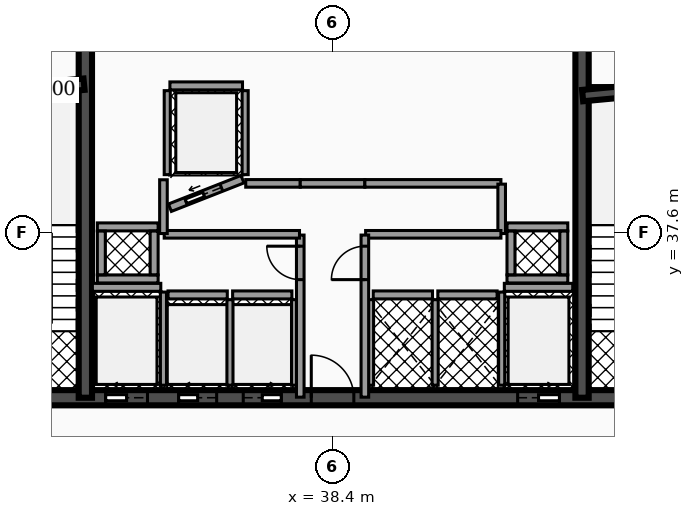
"""IFC4 building model, lengths in metres.
Left out: names, types, materials, properties, quantities, classifications, styles, units other than length and angle.
Written with IfcOpenShell. Run it as: python <this file> out.ifc"""

import sys

from ifc_helpers import new_model, si_unit, direction, frame, frame_2d, origin, place, context, subcontext, project, spatial, rectangle, extrude, element, fill, save


model = new_model("IFC4")
c1 = context("Model", 3, precision=1e-05, world=origin(), true_north=direction((0.0, 1.0)))
c2 = subcontext(c1, "Body", "Model", "MODEL_VIEW")
j1 = project(units=[si_unit("LENGTHUNIT", "METRE"), si_unit("PLANEANGLEUNIT", "RADIAN")], contexts=[c1])
p1 = place(None, origin())
s1 = spatial("IfcSite", under=j1, at=p1, CompositionType="ELEMENT")
p2 = place(p1, origin())
s2 = spatial("IfcBuilding", under=s1, at=p2, CompositionType="ELEMENT")
p3 = place(p2, frame((0.0, 0.0, 130.9)))
s3 = spatial("IfcBuildingStorey", under=s2, at=p3, CompositionType="ELEMENT", Elevation=130.9)
p4 = place(p3, frame((28.4, 33.25, 0.0), z_axis=(0.0, 0.0, 1.0), x_axis=(1.0, 0.0, 0.0)))
e1 = element("IfcWall", 1, at=p4, inside=s3, PredefinedType="SHEAR", context=c2, shape_type="SweptSolid", body=[
    extrude(rectangle(XDim=20.06, YDim=0.4, at=frame_2d((10.03, 0.0))), origin(), (0.0, 0.0, 1.0), 3.5),
])
p5 = place(p4, frame((4.03, 0.0, 0.0)))
e2 = element("IfcOpeningElement", 2, at=p5, cuts=e1, PredefinedType="OPENING", context=c2, shape_type="SweptSolid", body=[
    extrude(rectangle(XDim=1.1, YDim=2.15, at=frame_2d((0.55, 1.075))), frame((0.0, 0.21, 0.0), z_axis=(0.0, -1.0, 0.0), x_axis=(1.0, 0.0, 0.0)), (0.0, 0.0, 1.0), 0.42),
])
p6 = place(p4, frame((14.87, 0.0, 0.0)))
e3 = element("IfcOpeningElement", 3, at=p6, cuts=e1, PredefinedType="OPENING", context=c2, shape_type="SweptSolid", body=[
    extrude(rectangle(XDim=1.1, YDim=2.15, at=frame_2d((0.55, 1.075))), frame((0.0, 0.21, 0.0), z_axis=(0.0, -1.0, 0.0), x_axis=(1.0, 0.0, 0.0)), (0.0, 0.0, 1.0), 0.42),
])
p7 = place(p4, frame((5.95, 0.0, 0.0)))
e4 = element("IfcOpeningElement", 4, at=p7, cuts=e1, PredefinedType="OPENING", context=c2, shape_type="SweptSolid", body=[
    extrude(rectangle(XDim=1.0, YDim=2.1, at=frame_2d((0.5, 1.05))), frame((0.0, 0.21, 0.0), z_axis=(0.0, -1.0, 0.0), x_axis=(1.0, 0.0, 0.0)), (0.0, 0.0, 1.0), 0.42),
])
p8 = place(p4, frame((7.65, 0.0, 0.0)))
e5 = element("IfcOpeningElement", 5, at=p8, cuts=e1, PredefinedType="OPENING", context=c2, shape_type="SweptSolid", body=[
    extrude(rectangle(XDim=1.0, YDim=2.1, at=frame_2d((0.5, 1.05))), frame((0.0, 0.21, 0.0), z_axis=(0.0, -1.0, 0.0), x_axis=(1.0, 0.0, 0.0)), (0.0, 0.0, 1.0), 0.42),
])
p9 = place(p4, frame((1.31, 0.0, 0.0)))
e6 = element("IfcOpeningElement", 6, at=p9, cuts=e1, PredefinedType="OPENING", context=c2, shape_type="SweptSolid", body=[
    extrude(rectangle(XDim=1.1, YDim=2.2, at=frame_2d((0.55, 1.1))), frame((0.0, 0.21, 0.0), z_axis=(0.0, -1.0, 0.0), x_axis=(1.0, 0.0, 0.0)), (0.0, 0.0, 1.0), 0.42),
])
p10 = place(p4, frame((9.44, 0.0, 0.0)))
e7 = element("IfcOpeningElement", 7, at=p10, cuts=e1, PredefinedType="OPENING", context=c2, shape_type="SweptSolid", body=[
    extrude(rectangle(XDim=1.12, YDim=2.05, at=frame_2d((0.56, 1.025))), frame((0.0, 0.21, 0.0), z_axis=(0.0, -1.0, 0.0), x_axis=(1.0, 0.0, 0.0)), (0.0, 0.0, 1.0), 0.42),
])
p11 = place(p4, frame((17.65, 0.0, 0.0)))
e8 = element("IfcOpeningElement", 8, at=p11, cuts=e1, PredefinedType="OPENING", context=c2, shape_type="SweptSolid", body=[
    extrude(rectangle(XDim=1.1, YDim=2.2, at=frame_2d((0.55, 1.1))), frame((0.0, 0.21, 0.0), z_axis=(0.0, -1.0, 0.0), x_axis=(1.0, 0.0, 0.0)), (0.0, 0.0, 1.0), 0.42),
])
for number, where, z_axis, x_axis in (
    (9, (31.895, 33.25, 0.0), (0.0, 0.0, 1.0), (0.0, 1.0, 0.0)),
    (10, (44.965, 33.25, 0.0), (0.0, 0.0, 1.0), (0.0, 1.0, 0.0)),
):
    element("IfcWall", number, at=place(p3, frame(where, z_axis=z_axis, x_axis=x_axis)), inside=s3, PredefinedType="SHEAR", context=c2, shape_type="SweptSolid", body=[
        extrude(rectangle(XDim=10.2, YDim=0.35, at=frame_2d((5.1, 0.0))), origin(), (0.0, 0.0, 1.0), 3.5),
    ])
p12 = place(p3, frame((28.64, 41.2, 0.0), z_axis=(0.0, 0.0, 1.0), x_axis=(0.995687118776, 0.092774789157, 0.0)))
e11 = element("IfcWall", 11, at=p12, inside=s3, PredefinedType="SHEAR", context=c2, shape_type="SweptSolid", body=[
    extrude(rectangle(XDim=3.234, YDim=0.3, at=frame_2d((1.617, 0.0))), origin(), (0.0, 0.0, 1.0), 3.5),
])
p13 = place(p3, frame((44.98, 41.2, 0.0), z_axis=(0.0, 0.0, 1.0), x_axis=(0.995686468965, 0.09278176286, 0.0)))
e12 = element("IfcWall", 12, at=p13, inside=s3, PredefinedType="SHEAR", context=c2, shape_type="SweptSolid", body=[
    extrude(rectangle(XDim=3.234, YDim=0.3, at=frame_2d((1.617, 0.0))), origin(), (0.0, 0.0, 1.0), 3.5),
])
p14 = place(p3, frame((32.08, 36.155, 0.0), z_axis=(0.0, 0.0, 1.0), x_axis=(1.0, 0.0, 0.0)))
e13 = element("IfcWall", 13, at=p14, inside=s3, PredefinedType="SOLIDWALL", context=c2, shape_type="SweptSolid", body=[
    extrude(rectangle(XDim=1.8, YDim=0.21, at=frame_2d((0.9, 0.0))), origin(), (0.0, 0.0, 1.0), 2.472),
])
p15 = place(p3, frame((33.95, 33.58, 0.0), z_axis=(0.0, 0.0, 1.0), x_axis=(0.0, 1.0, 0.0)))
e14 = element("IfcWall", 14, at=p15, inside=s3, PredefinedType="SOLIDWALL", context=c2, shape_type="SweptSolid", body=[
    extrude(rectangle(XDim=2.45, YDim=0.16, at=frame_2d((1.225, 0.0))), origin(), (0.0, 0.0, 1.0), 2.472),
])
p16 = place(p3, frame((42.92, 36.155, 0.0), z_axis=(0.0, 0.0, 1.0), x_axis=(1.0, 0.0, 0.0)))
e15 = element("IfcWall", 15, at=p16, inside=s3, PredefinedType="SOLIDWALL", context=c2, shape_type="SweptSolid", body=[
    extrude(rectangle(XDim=1.8, YDim=0.21, at=frame_2d((0.9, 0.0))), origin(), (0.0, 0.0, 1.0), 2.472),
])
p17 = place(p3, frame((42.85, 33.58, 0.0), z_axis=(0.0, 0.0, 1.0), x_axis=(0.0, 1.0, 0.0)))
e16 = element("IfcWall", 16, at=p17, inside=s3, PredefinedType="SOLIDWALL", context=c2, shape_type="SweptSolid", body=[
    extrude(rectangle(XDim=2.45, YDim=0.16, at=frame_2d((1.225, 0.0))), origin(), (0.0, 0.0, 1.0), 2.472),
])
p18 = place(p3, frame((34.07, 35.955, 0.0), z_axis=(0.0, 0.0, 1.0), x_axis=(1.0, 0.0, 0.0)))
e17 = element("IfcWall", 17, at=p18, inside=s3, PredefinedType="SOLIDWALL", context=c2, shape_type="SweptSolid", body=[
    extrude(rectangle(XDim=1.56, YDim=0.21, at=frame_2d((0.78, 0.0))), origin(), (0.0, 0.0, 1.0), 2.472),
])
p19 = place(p3, frame((35.7, 33.58, 0.0), z_axis=(0.0, 0.0, 1.0), x_axis=(0.0, 1.0, 0.0)))
e18 = element("IfcWall", 18, at=p19, inside=s3, PredefinedType="SOLIDWALL", context=c2, shape_type="SweptSolid", body=[
    extrude(rectangle(XDim=2.25, YDim=0.16, at=frame_2d((1.125, 0.0))), origin(), (0.0, 0.0, 1.0), 2.472),
])
p20 = place(p3, frame((35.77, 35.955, 0.0), z_axis=(0.0, 0.0, 1.0), x_axis=(1.0, 0.0, 0.0)))
e19 = element("IfcWall", 19, at=p20, inside=s3, PredefinedType="SOLIDWALL", context=c2, shape_type="SweptSolid", body=[
    extrude(rectangle(XDim=1.56, YDim=0.21, at=frame_2d((0.78, 0.0))), origin(), (0.0, 0.0, 1.0), 2.472),
])
p21 = place(p3, frame((37.4, 33.58, 0.0), z_axis=(0.0, 0.0, 1.0), x_axis=(0.0, 1.0, 0.0)))
e20 = element("IfcWall", 20, at=p21, inside=s3, PredefinedType="SOLIDWALL", context=c2, shape_type="SweptSolid", body=[
    extrude(rectangle(XDim=2.25, YDim=0.16, at=frame_2d((1.125, 0.0))), origin(), (0.0, 0.0, 1.0), 2.472),
])
p22 = place(p3, frame((34.12, 38.25, 0.0), z_axis=(0.0, 0.0, 1.0), x_axis=(0.930804993012, 0.36551616241, 0.0)))
e21 = element("IfcWall", 21, at=p22, inside=s3, PredefinedType="SOLIDWALL", context=c2, shape_type="SweptSolid", body=[
    extrude(rectangle(XDim=2.052, YDim=0.21, at=frame_2d((1.026, 0.0))), origin(), (0.0, 0.0, 1.0), 2.472),
])
p23 = place(p22, frame((0.455, 0.0, 0.0)))
e22 = element("IfcOpeningElement", 22, at=p23, cuts=e21, PredefinedType="OPENING", context=c2, shape_type="SweptSolid", body=[
    extrude(rectangle(XDim=1.0, YDim=2.1, at=frame_2d((0.5, 1.05))), frame((0.0, 0.115, 0.0), z_axis=(0.0, -1.0, 0.0), x_axis=(1.0, 0.0, 0.0)), (0.0, 0.0, 1.0), 0.23),
])
p24 = place(p3, frame((34.12, 41.455, 0.0), z_axis=(0.0, 0.0, 1.0), x_axis=(1.0, 0.0, 0.0)))
e23 = element("IfcWall", 23, at=p24, inside=s3, PredefinedType="SOLIDWALL", context=c2, shape_type="SweptSolid", body=[
    extrude(rectangle(XDim=1.91, YDim=0.21, at=frame_2d((0.955, 0.0))), origin(), (0.0, 0.0, 1.0), 2.472),
])
for number, where, z_axis, x_axis in (
    (24, (34.05, 39.12, 0.0), (0.0, 0.0, 1.0), (0.0, 1.0, 0.0)),
    (25, (36.1, 39.12, 0.0), (0.0, 0.0, 1.0), (0.0, 1.0, 0.0)),
):
    element("IfcWall", number, at=place(p3, frame(where, z_axis=z_axis, x_axis=x_axis)), inside=s3, PredefinedType="SOLIDWALL", context=c2, shape_type="SweptSolid", body=[
        extrude(rectangle(XDim=2.21, YDim=0.16, at=frame_2d((1.105, 0.0))), origin(), (0.0, 0.0, 1.0), 2.472),
    ])
p25 = place(p3, frame((39.47, 35.955, 0.0), z_axis=(0.0, 0.0, 1.0), x_axis=(1.0, 0.0, 0.0)))
e26 = element("IfcWall", 26, at=p25, inside=s3, PredefinedType="SOLIDWALL", context=c2, shape_type="SweptSolid", body=[
    extrude(rectangle(XDim=1.56, YDim=0.21, at=frame_2d((0.78, 0.0))), origin(), (0.0, 0.0, 1.0), 2.472),
])
for number, where, z_axis, x_axis in (
    (27, (39.4, 33.58, 0.0), (0.0, 0.0, 1.0), (0.0, 1.0, 0.0)),
    (28, (41.1, 33.58, 0.0), (0.0, 0.0, 1.0), (0.0, 1.0, 0.0)),
):
    element("IfcWall", number, at=place(p3, frame(where, z_axis=z_axis, x_axis=x_axis)), inside=s3, PredefinedType="SOLIDWALL", context=c2, shape_type="SweptSolid", body=[
        extrude(rectangle(XDim=2.25, YDim=0.16, at=frame_2d((1.125, 0.0))), origin(), (0.0, 0.0, 1.0), 2.472),
    ])
p26 = place(p3, frame((41.17, 35.955, 0.0), z_axis=(0.0, 0.0, 1.0), x_axis=(1.0, 0.0, 0.0)))
e29 = element("IfcWall", 29, at=p26, inside=s3, PredefinedType="SOLIDWALL", context=c2, shape_type="SweptSolid", body=[
    extrude(rectangle(XDim=1.56, YDim=0.21, at=frame_2d((0.78, 0.0))), origin(), (0.0, 0.0, 1.0), 2.472),
])
for number, where, z_axis, x_axis in (
    (30, (32.21, 36.375, 0.0), (0.0, 0.0, 1.0), (1.0, 0.0, 0.0)),
    (31, (32.21, 37.745, 0.0), (0.0, 0.0, 1.0), (1.0, 0.0, 0.0)),
):
    element("IfcWall", number, at=place(p3, frame(where, z_axis=z_axis, x_axis=x_axis)), inside=s3, PredefinedType="SOLIDWALL", context=c2, shape_type="SweptSolid", body=[
        extrude(rectangle(XDim=1.6, YDim=0.21, at=frame_2d((0.8, 0.0))), origin(), (0.0, 0.0, 1.0), 3.5),
    ])
for number, where, z_axis, x_axis in (
    (32, (32.315, 36.485, 0.0), (0.0, 0.0, 1.0), (0.0, 1.0, 0.0)),
    (33, (33.705, 36.485, 0.0), (0.0, 0.0, 1.0), (0.0, 1.0, 0.0)),
):
    element("IfcWall", number, at=place(p3, frame(where, z_axis=z_axis, x_axis=x_axis)), inside=s3, PredefinedType="SOLIDWALL", context=c2, shape_type="SweptSolid", body=[
        extrude(rectangle(XDim=1.15, YDim=0.21, at=frame_2d((0.575, 0.0))), origin(), (0.0, 0.0, 1.0), 3.5),
    ])
for number, where, z_axis, x_axis in (
    (34, (42.99, 36.375, 0.0), (0.0, 0.0, 1.0), (1.0, 0.0, 0.0)),
    (35, (42.99, 37.745, 0.0), (0.0, 0.0, 1.0), (1.0, 0.0, 0.0)),
):
    element("IfcWall", number, at=place(p3, frame(where, z_axis=z_axis, x_axis=x_axis)), inside=s3, PredefinedType="SOLIDWALL", context=c2, shape_type="SweptSolid", body=[
        extrude(rectangle(XDim=1.6, YDim=0.21, at=frame_2d((0.8, 0.0))), origin(), (0.0, 0.0, 1.0), 3.5),
    ])
for number, where, z_axis, x_axis in (
    (36, (43.095, 36.485, 0.0), (0.0, 0.0, 1.0), (0.0, 1.0, 0.0)),
    (37, (44.485, 36.485, 0.0), (0.0, 0.0, 1.0), (0.0, 1.0, 0.0)),
):
    element("IfcWall", number, at=place(p3, frame(where, z_axis=z_axis, x_axis=x_axis)), inside=s3, PredefinedType="SOLIDWALL", context=c2, shape_type="SweptSolid", body=[
        extrude(rectangle(XDim=1.15, YDim=0.21, at=frame_2d((0.575, 0.0))), origin(), (0.0, 0.0, 1.0), 3.5),
    ])
p27 = place(p3, frame((37.55, 33.265, 0.0), z_axis=(0.0, 0.0, 1.0), x_axis=(0.0, 1.0, 0.0)))
e38 = element("IfcWall", 38, at=p27, inside=s3, PredefinedType="PARTITIONING", context=c2, shape_type="SweptSolid", body=[
    extrude(rectangle(XDim=4.265, YDim=0.2, at=frame_2d((2.133, 0.0))), origin(), (0.0, 0.0, 1.0), 2.457),
])
p28 = place(p27, frame((3.093, 0.0, 0.0)))
e39 = element("IfcOpeningElement", 39, at=p28, cuts=e38, PredefinedType="OPENING", context=c2, shape_type="SweptSolid", body=[
    extrude(rectangle(XDim=0.88, YDim=2.05, at=frame_2d((0.44, 1.025))), frame((0.0, 0.11, 0.0), z_axis=(0.0, -1.0, 0.0), x_axis=(1.0, 0.0, 0.0)), (0.0, 0.0, 1.0), 0.22),
])
p29 = place(p3, frame((33.97, 37.55, 0.0), z_axis=(0.0, 0.0, 1.0), x_axis=(1.0, 0.0, 0.0)))
e40 = element("IfcWall", 40, at=p29, inside=s3, PredefinedType="PARTITIONING", context=c2, shape_type="SweptSolid", body=[
    extrude(rectangle(XDim=3.56, YDim=0.2, at=frame_2d((1.78, 0.0))), origin(), (0.0, 0.0, 1.0), 2.457),
])
p30 = place(p3, frame((33.95, 37.57, 0.0), z_axis=(0.0, 0.0, 1.0), x_axis=(0.0, 1.0, 0.0)))
e41 = element("IfcWall", 41, at=p30, inside=s3, PredefinedType="PARTITIONING", context=c2, shape_type="SweptSolid", body=[
    extrude(rectangle(XDim=1.415, YDim=0.2, at=frame_2d((0.708, 0.0))), origin(), (0.0, 0.0, 1.0), 2.457),
])
p31 = place(p3, frame((36.115, 38.89, 0.0), z_axis=(0.0, 0.0, 1.0), x_axis=(1.0, 0.0, 0.0)))
e42 = element("IfcWall", 42, at=p31, inside=s3, PredefinedType="PARTITIONING", context=c2, shape_type="SweptSolid", body=[
    extrude(rectangle(XDim=1.435, YDim=0.2, at=frame_2d((0.718, 0.0))), origin(), (0.0, 0.0, 1.0), 2.457),
])
p32 = place(p3, frame((37.55, 38.89, 0.0), z_axis=(0.0, 0.0, 1.0), x_axis=(1.0, 0.0, 0.0)))
e43 = element("IfcWall", 43, at=p32, inside=s3, PredefinedType="PARTITIONING", context=c2, shape_type="SweptSolid", body=[
    extrude(rectangle(XDim=1.7, YDim=0.2, at=frame_2d((0.85, 0.0))), origin(), (0.0, 0.0, 1.0), 2.457),
])
p33 = place(p3, frame((39.25, 38.89, 0.0), z_axis=(0.0, 0.0, 1.0), x_axis=(1.0, 0.0, 0.0)))
e44 = element("IfcWall", 44, at=p33, inside=s3, PredefinedType="PARTITIONING", context=c2, shape_type="SweptSolid", body=[
    extrude(rectangle(XDim=3.58, YDim=0.2, at=frame_2d((1.79, 0.0))), origin(), (0.0, 0.0, 1.0), 2.457),
])
p34 = place(p3, frame((42.85, 37.57, 0.0), z_axis=(0.0, 0.0, 1.0), x_axis=(0.0, 1.0, 0.0)))
e45 = element("IfcWall", 45, at=p34, inside=s3, PredefinedType="PARTITIONING", context=c2, shape_type="SweptSolid", body=[
    extrude(rectangle(XDim=1.3, YDim=0.2, at=frame_2d((0.65, 0.0))), origin(), (0.0, 0.0, 1.0), 2.457),
])
p35 = place(p3, frame((39.27, 37.55, 0.0), z_axis=(0.0, 0.0, 1.0), x_axis=(1.0, 0.0, 0.0)))
e46 = element("IfcWall", 46, at=p35, inside=s3, PredefinedType="PARTITIONING", context=c2, shape_type="SweptSolid", body=[
    extrude(rectangle(XDim=3.56, YDim=0.2, at=frame_2d((1.78, 0.0))), origin(), (0.0, 0.0, 1.0), 2.457),
])
p36 = place(p3, frame((39.25, 33.265, 0.0), z_axis=(0.0, 0.0, 1.0), x_axis=(0.0, 1.0, 0.0)))
e47 = element("IfcWall", 47, at=p36, inside=s3, PredefinedType="PARTITIONING", context=c2, shape_type="SweptSolid", body=[
    extrude(rectangle(XDim=4.265, YDim=0.2, at=frame_2d((2.133, 0.0))), origin(), (0.0, 0.0, 1.0), 2.457),
])
p37 = place(p36, frame((3.093, 0.0, 0.0)))
e48 = element("IfcOpeningElement", 48, at=p37, cuts=e47, PredefinedType="OPENING", context=c2, shape_type="SweptSolid", body=[
    extrude(rectangle(XDim=0.88, YDim=2.05, at=frame_2d((0.44, 1.025))), frame((0.0, 0.11, 0.0), z_axis=(0.0, -1.0, 0.0), x_axis=(1.0, 0.0, 0.0)), (0.0, 0.0, 1.0), 0.22),
])
p38 = place(p5, origin())
e49 = element("IfcDoor", 49, at=p38, inside=s3, OperationType="SLIDING_TO_LEFT", PredefinedType="DOOR", context=c2, shape_type="SweptSolid", body=[
    extrude(rectangle(XDim=1.1, YDim=2.15, at=frame_2d((0.55, 1.075))), frame((0.0, 0.025, 0.0), z_axis=(0.0, -1.0, 0.0), x_axis=(1.0, 0.0, 0.0)), (0.0, 0.0, 1.0), 0.05),
])
fill(e2, e49)
p39 = place(p6, origin())
e50 = element("IfcDoor", 50, at=p39, inside=s3, OperationType="SLIDING_TO_RIGHT", PredefinedType="DOOR", context=c2, shape_type="SweptSolid", body=[
    extrude(rectangle(XDim=1.1, YDim=2.15, at=frame_2d((0.55, 1.075))), frame((0.0, 0.025, 0.0), z_axis=(0.0, -1.0, 0.0), x_axis=(1.0, 0.0, 0.0)), (0.0, 0.0, 1.0), 0.05),
])
fill(e3, e50)
p40 = place(p7, origin())
e51 = element("IfcDoor", 51, at=p40, inside=s3, OperationType="SLIDING_TO_LEFT", PredefinedType="DOOR", context=c2, shape_type="SweptSolid", body=[
    extrude(rectangle(XDim=1.0, YDim=2.1, at=frame_2d((0.5, 1.05))), frame((0.0, 0.025, 0.0), z_axis=(0.0, -1.0, 0.0), x_axis=(1.0, 0.0, 0.0)), (0.0, 0.0, 1.0), 0.05),
])
fill(e4, e51)
p41 = place(p8, origin())
e52 = element("IfcDoor", 52, at=p41, inside=s3, OperationType="SLIDING_TO_RIGHT", PredefinedType="DOOR", context=c2, shape_type="SweptSolid", body=[
    extrude(rectangle(XDim=1.0, YDim=2.1, at=frame_2d((0.5, 1.05))), frame((0.0, 0.025, 0.0), z_axis=(0.0, -1.0, 0.0), x_axis=(1.0, 0.0, 0.0)), (0.0, 0.0, 1.0), 0.05),
])
fill(e5, e52)
p42 = place(p23, origin())
e53 = element("IfcDoor", 53, at=p42, inside=s3, OperationType="SLIDING_TO_LEFT", PredefinedType="DOOR", context=c2, shape_type="SweptSolid", body=[
    extrude(rectangle(XDim=1.0, YDim=2.1, at=frame_2d((0.5, 1.05))), frame((0.0, 0.025, 0.0), z_axis=(0.0, -1.0, 0.0), x_axis=(1.0, 0.0, 0.0)), (0.0, 0.0, 1.0), 0.05),
])
fill(e22, e53)
p43 = place(p10, origin())
e54 = element("IfcDoor", 54, at=p43, inside=s3, OperationType="SINGLE_SWING_LEFT", PredefinedType="DOOR", context=c2, shape_type="SweptSolid", body=[
    extrude(rectangle(XDim=1.12, YDim=2.05, at=frame_2d((0.56, 1.025))), frame((0.0, 0.025, 0.0), z_axis=(0.0, -1.0, 0.0), x_axis=(1.0, 0.0, 0.0)), (0.0, 0.0, 1.0), 0.05),
])
fill(e7, e54)
p44 = place(p28, origin())
e55 = element("IfcDoor", 55, at=p44, inside=s3, OperationType="SINGLE_SWING_RIGHT", PredefinedType="DOOR", context=c2, shape_type="SweptSolid", body=[
    extrude(rectangle(XDim=0.88, YDim=2.05, at=frame_2d((0.44, 1.025))), frame((0.0, 0.025, 0.0), z_axis=(0.0, -1.0, 0.0), x_axis=(1.0, 0.0, 0.0)), (0.0, 0.0, 1.0), 0.05),
])
fill(e39, e55)
p45 = place(p37, origin())
e56 = element("IfcDoor", 56, at=p45, inside=s3, OperationType="SINGLE_SWING_LEFT", PredefinedType="DOOR", context=c2, shape_type="SweptSolid", body=[
    extrude(rectangle(XDim=0.88, YDim=2.05, at=frame_2d((0.44, 1.025))), frame((0.0, 0.025, 0.0), z_axis=(0.0, -1.0, 0.0), x_axis=(1.0, 0.0, 0.0)), (0.0, 0.0, 1.0), 0.05),
])
fill(e48, e56)
save(model, sys.argv[1])
